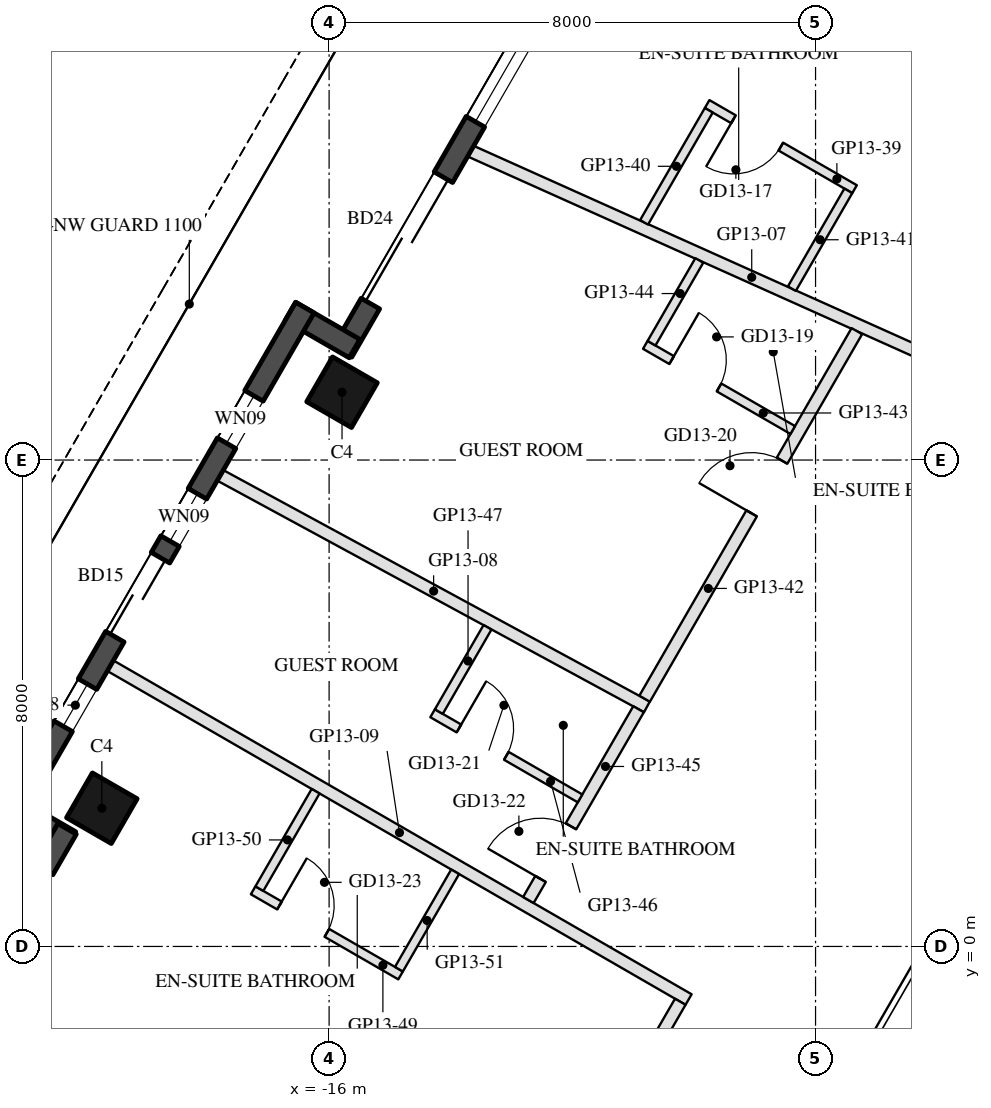
"""IFC4 building model, lengths in metres.
Left out: names, types, materials, properties, quantities, classifications, styles, units other than length and angle.
Written with IfcOpenShell. Run it as: python <this file> out.ifc"""

import sys

from ifc_helpers import new_model, si_unit, direction, frame, frame_2d, origin, origin_2d, place, context, subcontext, project, spatial, rectangle, hollow_rectangle, extrude, element, fill, save


model = new_model("IFC4")
c1 = context("Model", 3, precision=1e-05, world=origin(), true_north=direction((0.0, 1.0)))
c2 = subcontext(c1, "Body", "Model", "MODEL_VIEW")
j1 = project(units=[si_unit("LENGTHUNIT", "METRE"), si_unit("PLANEANGLEUNIT", "RADIAN")], contexts=[c1])
p1 = place(None, origin())
s1 = spatial("IfcSite", under=j1, at=p1, CompositionType="ELEMENT")
p2 = place(p1, origin())
s2 = spatial("IfcBuilding", under=s1, at=p2, CompositionType="ELEMENT")
p3 = place(p2, frame((0.0, 0.0, 157.7)))
s3 = spatial("IfcBuildingStorey", under=s2, at=p3, CompositionType="ELEMENT", Elevation=157.7)
for number, where, z_axis, x_axis in (
    (1, (-15.788, 9.115, 0.0), (0.0, 0.0, 1.0), (0.5, 0.866, 0.0)),
    (2, (-19.738, 2.273, 0.0), (0.0, 0.0, 1.0), (0.5, 0.866, 0.0)),
):
    element("IfcColumn", number, at=place(p3, frame(where, z_axis=z_axis, x_axis=x_axis)), inside=s3, PredefinedType="COLUMN", context=c2, shape_type="SweptSolid", body=[
        extrude(hollow_rectangle(XDim=0.85, YDim=0.85, WallThickness=0.04, at=origin_2d()), origin(), (0.0, 0.0, 1.0), 3.7),
    ])
p4 = place(p3, frame((-12.409, 15.617, 0.0), z_axis=(0.0, 0.0, 1.0), x_axis=(-0.500003597184, -0.866023326939, 0.0)))
e3 = element("IfcWall", 3, at=p4, inside=s3, PredefinedType="SOLIDWALL", context=c2, shape_type="SweptSolid", body=[
    extrude(rectangle(XDim=6.74, YDim=0.35, at=frame_2d((3.37, 0.0))), origin(), (0.0, 0.0, 1.0), 3.55),
])
p5 = place(p4, frame((0.77, 0.0, 0.3)))
e4 = element("IfcOpeningElement", 4, at=p5, cuts=e3, PredefinedType="OPENING", context=c2, shape_type="SweptSolid", body=[
    extrude(rectangle(XDim=1.6, YDim=2.65, at=frame_2d((0.8, 1.325))), frame((0.0, 0.185, 0.0), z_axis=(0.0, -1.0, 0.0), x_axis=(1.0, 0.0, 0.0)), (0.0, 0.0, 1.0), 0.37),
])
p6 = place(p4, frame((3.424, 0.0, 0.0)))
e5 = element("IfcOpeningElement", 5, at=p6, cuts=e3, PredefinedType="OPENING", context=c2, shape_type="SweptSolid", body=[
    extrude(rectangle(XDim=2.4, YDim=2.4, at=frame_2d((1.2, 1.2))), frame((0.0, 0.185, 0.0), z_axis=(0.0, -1.0, 0.0), x_axis=(1.0, 0.0, 0.0)), (0.0, 0.0, 1.0), 0.37),
])
p7 = place(p3, frame((-15.581, 9.833, 0.0), z_axis=(0.0, 0.0, 1.0), x_axis=(-0.866055662726, 0.499947586314, 0.0)))
e6 = element("IfcWall", 6, at=p7, inside=s3, PredefinedType="SOLIDWALL", context=c2, shape_type="SweptSolid", body=[
    extrude(rectangle(XDim=1.22, YDim=0.35, at=frame_2d((0.61, 0.0))), origin(), (0.0, 0.0, 1.0), 3.55),
])
p8 = place(p3, frame((-16.398, 10.507, 0.0), z_axis=(0.0, 0.0, 1.0), x_axis=(-0.499999142773, -0.866025898704, 0.0)))
e7 = element("IfcWall", 7, at=p8, inside=s3, PredefinedType="SOLIDWALL", context=c2, shape_type="SweptSolid", body=[
    extrude(rectangle(XDim=9.7, YDim=0.35, at=frame_2d((4.85, 0.0))), origin(), (0.0, 0.0, 1.0), 3.55),
])
p9 = place(p8, frame((1.675, 0.0, 0.3)))
e8 = element("IfcOpeningElement", 8, at=p9, cuts=e7, PredefinedType="OPENING", context=c2, shape_type="SweptSolid", body=[
    extrude(rectangle(XDim=0.9, YDim=2.65, at=frame_2d((0.45, 1.325))), frame((0.0, 0.185, 0.0), z_axis=(0.0, -1.0, 0.0), x_axis=(1.0, 0.0, 0.0)), (0.0, 0.0, 1.0), 0.37),
])
p10 = place(p8, frame((4.75, 0.0, 0.0)))
e9 = element("IfcOpeningElement", 9, at=p10, cuts=e7, PredefinedType="OPENING", context=c2, shape_type="SweptSolid", body=[
    extrude(rectangle(XDim=1.5, YDim=2.4, at=frame_2d((0.75, 1.2))), frame((0.0, 0.185, 0.0), z_axis=(0.0, -1.0, 0.0), x_axis=(1.0, 0.0, 0.0)), (0.0, 0.0, 1.0), 0.37),
])
p11 = place(p8, frame((3.535, 0.0, 0.3)))
e10 = element("IfcOpeningElement", 10, at=p11, cuts=e7, PredefinedType="OPENING", context=c2, shape_type="SweptSolid", body=[
    extrude(rectangle(XDim=0.9, YDim=2.65, at=frame_2d((0.45, 1.325))), frame((0.0, 0.185, 0.0), z_axis=(0.0, -1.0, 0.0), x_axis=(1.0, 0.0, 0.0)), (0.0, 0.0, 1.0), 0.37),
])
p12 = place(p8, frame((7.15, 0.0, 0.3)))
e11 = element("IfcOpeningElement", 11, at=p12, cuts=e7, PredefinedType="OPENING", context=c2, shape_type="SweptSolid", body=[
    extrude(rectangle(XDim=0.8, YDim=2.65, at=frame_2d((0.4, 1.325))), frame((0.0, 0.185, 0.0), z_axis=(0.0, -1.0, 0.0), x_axis=(1.0, 0.0, 0.0)), (0.0, 0.0, 1.0), 0.37),
])
p13 = place(p3, frame((-21.312, 2.346, 0.0), z_axis=(0.0, 0.0, 1.0), x_axis=(0.866005645448, -0.500034220881, 0.0)))
e12 = element("IfcWall", 12, at=p13, inside=s3, PredefinedType="SOLIDWALL", context=c2, shape_type="SweptSolid", body=[
    extrude(rectangle(XDim=1.22, YDim=0.35, at=frame_2d((0.61, 0.0))), origin(), (0.0, 0.0, 1.0), 3.55),
])
p14 = place(p3, frame((-20.309, 1.934, 0.0), z_axis=(0.0, 0.0, 1.0), x_axis=(-0.499992114976, -0.866029956157, 0.0)))
e13 = element("IfcWall", 13, at=p14, inside=s3, PredefinedType="SOLIDWALL", context=c2, shape_type="SweptSolid", body=[
    extrude(rectangle(XDim=6.74, YDim=0.35, at=frame_2d((3.37, 0.0))), origin(), (0.0, 0.0, 1.0), 3.55),
])
p15 = place(p14, frame((0.77, 0.0, 0.0)))
e14 = element("IfcOpeningElement", 14, at=p15, cuts=e13, PredefinedType="OPENING", context=c2, shape_type="SweptSolid", body=[
    extrude(rectangle(XDim=2.4, YDim=2.4, at=frame_2d((1.2, 1.2))), frame((0.0, 0.185, 0.0), z_axis=(0.0, -1.0, 0.0), x_axis=(1.0, 0.0, 0.0)), (0.0, 0.0, 1.0), 0.37),
])
p16 = place(p14, frame((3.47, 0.0, 0.3)))
e15 = element("IfcOpeningElement", 15, at=p16, cuts=e13, PredefinedType="OPENING", context=c2, shape_type="SweptSolid", body=[
    extrude(rectangle(XDim=2.9, YDim=2.65, at=frame_2d((1.45, 1.325))), frame((0.0, 0.185, 0.0), z_axis=(0.0, -1.0, 0.0), x_axis=(1.0, 0.0, 0.0)), (0.0, 0.0, 1.0), 0.37),
])
p17 = place(p3, frame((-13.672, 13.08, 0.0), z_axis=(0.0, 0.0, 1.0), x_axis=(0.912311972773, -0.409495866077, 0.0)))
e16 = element("IfcWall", 16, at=p17, inside=s3, PredefinedType="PARTITIONING", context=c2, shape_type="SweptSolid", body=[
    extrude(rectangle(XDim=10.132, YDim=0.2, at=frame_2d((5.066, 0.0))), origin(), (0.0, 0.0, 1.0), 3.06),
])
p18 = place(p3, frame((-17.79, 7.748, 0.0), z_axis=(0.0, 0.0, 1.0), x_axis=(0.878932558121, -0.476946074808, 0.0)))
e17 = element("IfcWall", 17, at=p18, inside=s3, PredefinedType="PARTITIONING", context=c2, shape_type="SweptSolid", body=[
    extrude(rectangle(XDim=7.983, YDim=0.2, at=frame_2d((3.991, 0.0))), origin(), (0.0, 0.0, 1.0), 3.06),
])
p19 = place(p3, frame((-19.597, 4.617, 0.0), z_axis=(0.0, 0.0, 1.0), x_axis=(0.866027479907, -0.499996404033, 0.0)))
e18 = element("IfcWall", 18, at=p19, inside=s3, PredefinedType="PARTITIONING", context=c2, shape_type="SweptSolid", body=[
    extrude(rectangle(XDim=10.98, YDim=0.2, at=frame_2d((5.49, 0.0))), origin(), (0.0, 0.0, 1.0), 3.06),
])
p20 = place(p3, frame((-7.358, 12.455, 0.0), z_axis=(0.0, 0.0, 1.0), x_axis=(-0.866034573852, 0.49998411664, 0.0)))
e19 = element("IfcWall", 19, at=p20, inside=s3, PredefinedType="PARTITIONING", context=c2, shape_type="SweptSolid", body=[
    extrude(rectangle(XDim=2.8, YDim=0.15, at=frame_2d((1.4, 0.0))), origin(), (0.0, 0.0, 1.0), 3.55),
])
p21 = place(p20, frame((1.4, 0.0, 0.0)))
e20 = element("IfcOpeningElement", 20, at=p21, cuts=e19, PredefinedType="OPENING", context=c2, shape_type="SweptSolid", body=[
    extrude(rectangle(XDim=0.9, YDim=2.1, at=frame_2d((0.45, 1.05))), frame((0.0, 0.085, 0.0), z_axis=(0.0, -1.0, 0.0), x_axis=(1.0, 0.0, 0.0)), (0.0, 0.0, 1.0), 0.17),
])
p22 = place(p3, frame((-9.756, 13.752, 0.0), z_axis=(0.0, 0.0, 1.0), x_axis=(-0.50001378257, -0.866017446268, 0.0)))
e21 = element("IfcWall", 21, at=p22, inside=s3, PredefinedType="PARTITIONING", context=c2, shape_type="SweptSolid", body=[
    extrude(rectangle(XDim=2.128, YDim=0.15, at=frame_2d((1.064, 0.0))), origin(), (0.0, 0.0, 1.0), 3.55),
])
p23 = place(p3, frame((-7.461, 12.427, 0.0), z_axis=(0.0, 0.0, 1.0), x_axis=(-0.500025795397, -0.866010510293, 0.0)))
e22 = element("IfcWall", 22, at=p23, inside=s3, PredefinedType="PARTITIONING", context=c2, shape_type="SweptSolid", body=[
    extrude(rectangle(XDim=1.858, YDim=0.15, at=frame_2d((0.929, 0.0))), origin(), (0.0, 0.0, 1.0), 3.55),
])
p24 = place(p3, frame((-10.811, 4.075, 0.0), z_axis=(0.0, 0.0, 1.0), x_axis=(0.500006032813, 0.86602192071, 0.0)))
e23 = element("IfcWall", 23, at=p24, inside=s3, PredefinedType="PARTITIONING", context=c2, shape_type="SweptSolid", body=[
    extrude(rectangle(XDim=6.98, YDim=0.2, at=frame_2d((3.49, 0.0))), origin(), (0.0, 0.0, 1.0), 2.95),
])
p25 = place(p24, frame((3.52, 0.0, 0.0)))
e24 = element("IfcOpeningElement", 24, at=p25, cuts=e23, PredefinedType="OPENING", context=c2, shape_type="SweptSolid", body=[
    extrude(rectangle(XDim=1.0, YDim=2.1, at=frame_2d((0.5, 1.05))), frame((0.0, 0.11, 0.0), z_axis=(0.0, -1.0, 0.0), x_axis=(1.0, 0.0, 0.0)), (0.0, 0.0, 1.0), 0.22),
])
p26 = place(p3, frame((-10.8, 9.894, 0.0), z_axis=(0.0, 0.0, 1.0), x_axis=(0.866056369097, -0.49994636267, 0.0)))
e25 = element("IfcWall", 25, at=p26, inside=s3, PredefinedType="PARTITIONING", context=c2, shape_type="SweptSolid", body=[
    extrude(rectangle(XDim=2.8, YDim=0.15, at=frame_2d((1.4, 0.0))), origin(), (0.0, 0.0, 1.0), 3.55),
])
p27 = place(p26, frame((0.5, 0.0, 0.0)))
e26 = element("IfcOpeningElement", 26, at=p27, cuts=e25, PredefinedType="OPENING", context=c2, shape_type="SweptSolid", body=[
    extrude(rectangle(XDim=0.9, YDim=2.1, at=frame_2d((0.45, 1.05))), frame((0.0, 0.085, 0.0), z_axis=(0.0, -1.0, 0.0), x_axis=(1.0, 0.0, 0.0)), (0.0, 0.0, 1.0), 0.17),
])
p28 = place(p3, frame((-9.912, 11.283, 0.0), z_axis=(0.0, 0.0, 1.0), x_axis=(-0.499964459118, -0.86604592235, 0.0)))
e27 = element("IfcWall", 27, at=p28, inside=s3, PredefinedType="PARTITIONING", context=c2, shape_type="SweptSolid", body=[
    extrude(rectangle(XDim=1.572, YDim=0.15, at=frame_2d((0.786, 0.0))), origin(), (0.0, 0.0, 1.0), 2.95),
])
p29 = place(p3, frame((-12.723, 0.764, 0.0), z_axis=(0.0, 0.0, 1.0), x_axis=(0.500016018658, 0.86601615521, 0.0)))
e28 = element("IfcWall", 28, at=p29, inside=s3, PredefinedType="PARTITIONING", context=c2, shape_type="SweptSolid", body=[
    extrude(rectangle(XDim=3.624, YDim=0.2, at=frame_2d((1.812, 0.0))), origin(), (0.0, 0.0, 1.0), 2.95),
])
p30 = place(p29, frame((0.4, 0.0, 0.0)))
e29 = element("IfcOpeningElement", 29, at=p30, cuts=e28, PredefinedType="OPENING", context=c2, shape_type="SweptSolid", body=[
    extrude(rectangle(XDim=1.0, YDim=2.1, at=frame_2d((0.5, 1.05))), frame((0.0, 0.11, 0.0), z_axis=(0.0, -1.0, 0.0), x_axis=(1.0, 0.0, 0.0)), (0.0, 0.0, 1.0), 0.22),
])
p31 = place(p3, frame((-14.298, 3.835, 0.0), z_axis=(0.0, 0.0, 1.0), x_axis=(0.866056369097, -0.49994636267, 0.0)))
e30 = element("IfcWall", 30, at=p31, inside=s3, PredefinedType="PARTITIONING", context=c2, shape_type="SweptSolid", body=[
    extrude(rectangle(XDim=2.8, YDim=0.15, at=frame_2d((1.4, 0.0))), origin(), (0.0, 0.0, 1.0), 2.95),
])
p32 = place(p31, frame((0.5, 0.0, 0.0)))
e31 = element("IfcOpeningElement", 31, at=p32, cuts=e30, PredefinedType="OPENING", context=c2, shape_type="SweptSolid", body=[
    extrude(rectangle(XDim=0.9, YDim=2.1, at=frame_2d((0.45, 1.05))), frame((0.0, 0.085, 0.0), z_axis=(0.0, -1.0, 0.0), x_axis=(1.0, 0.0, 0.0)), (0.0, 0.0, 1.0), 0.17),
])
p33 = place(p3, frame((-13.395, 5.249, 0.0), z_axis=(0.0, 0.0, 1.0), x_axis=(-0.499960029081, -0.866048479775, 0.0)))
e32 = element("IfcWall", 32, at=p33, inside=s3, PredefinedType="PARTITIONING", context=c2, shape_type="SweptSolid", body=[
    extrude(rectangle(XDim=1.601, YDim=0.15, at=frame_2d((0.801, 0.0))), origin(), (0.0, 0.0, 1.0), 3.55),
])
p34 = place(p3, frame((-12.269, -4.45, 0.0), z_axis=(0.0, 0.0, 1.0), x_axis=(0.500011931275, 0.86601851515, 0.0)))
e33 = element("IfcWall", 33, at=p34, inside=s3, PredefinedType="PARTITIONING", context=c2, shape_type="SweptSolid", body=[
    extrude(rectangle(XDim=4.088, YDim=0.2, at=frame_2d((2.044, 0.0))), origin(), (0.0, 0.0, 1.0), 2.95),
])
p35 = place(p34, frame((1.544, 0.0, 0.0)))
e34 = element("IfcOpeningElement", 34, at=p35, cuts=e33, PredefinedType="OPENING", context=c2, shape_type="SweptSolid", body=[
    extrude(rectangle(XDim=1.0, YDim=2.1, at=frame_2d((0.5, 1.05))), frame((0.0, 0.11, 0.0), z_axis=(0.0, -1.0, 0.0), x_axis=(1.0, 0.0, 0.0)), (0.0, 0.0, 1.0), 0.22),
])
p36 = place(p3, frame((-17.249, 0.923, 0.0), z_axis=(0.0, 0.0, 1.0), x_axis=(0.866034573852, -0.49998411664, 0.0)))
e35 = element("IfcWall", 35, at=p36, inside=s3, PredefinedType="PARTITIONING", context=c2, shape_type="SweptSolid", body=[
    extrude(rectangle(XDim=2.8, YDim=0.15, at=frame_2d((1.4, 0.0))), origin(), (0.0, 0.0, 1.0), 2.95),
])
p37 = place(p36, frame((0.5, 0.0, 0.0)))
e36 = element("IfcOpeningElement", 36, at=p37, cuts=e35, PredefinedType="OPENING", context=c2, shape_type="SweptSolid", body=[
    extrude(rectangle(XDim=0.9, YDim=2.1, at=frame_2d((0.45, 1.05))), frame((0.0, 0.085, 0.0), z_axis=(0.0, -1.0, 0.0), x_axis=(1.0, 0.0, 0.0)), (0.0, 0.0, 1.0), 0.17),
])
for number, where, z_axis, x_axis in (
    (37, (-16.222, 2.553, 0.0), (0.0, 0.0, 1.0), (-0.5, -0.866, 0.0)),
    (38, (-13.927, 1.228, 0.0), (0.0, 0.0, 1.0), (-0.5, -0.866, 0.0)),
):
    element("IfcWall", number, at=place(p3, frame(where, z_axis=z_axis, x_axis=x_axis)), inside=s3, PredefinedType="PARTITIONING", context=c2, shape_type="SweptSolid", body=[
        extrude(rectangle(XDim=1.85, YDim=0.15, at=frame_2d((0.925, 0.0))), origin(), (0.0, 0.0, 1.0), 3.55),
    ])
p38 = place(p5, origin())
e39 = element("IfcWindow", 39, at=p38, inside=s3, PartitioningType="SINGLE_PANEL", PredefinedType="WINDOW", context=c2, shape_type="SweptSolid", body=[
    extrude(rectangle(XDim=1.6, YDim=2.65, at=frame_2d((0.8, 1.325))), frame((0.0, 0.03, 0.0), z_axis=(0.0, -1.0, 0.0), x_axis=(1.0, 0.0, 0.0)), (0.0, 0.0, 1.0), 0.06),
])
fill(e4, e39)
p39 = place(p6, frame((2.4, 0.0, 0.0), z_axis=(0.0, 0.0, 1.0), x_axis=(-1.0, 0.0, 0.0)))
e40 = element("IfcDoor", 40, at=p39, inside=s3, OperationType="SLIDING_TO_LEFT", PredefinedType="DOOR", context=c2, shape_type="SweptSolid", body=[
    extrude(rectangle(XDim=2.4, YDim=2.4, at=frame_2d((1.2, 1.2))), frame((0.0, 0.025, 0.0), z_axis=(0.0, -1.0, 0.0), x_axis=(1.0, 0.0, 0.0)), (0.0, 0.0, 1.0), 0.05),
])
fill(e5, e40)
p40 = place(p9, origin())
e41 = element("IfcWindow", 41, at=p40, inside=s3, PartitioningType="SINGLE_PANEL", PredefinedType="WINDOW", context=c2, shape_type="SweptSolid", body=[
    extrude(rectangle(XDim=0.9, YDim=2.65, at=frame_2d((0.45, 1.325))), frame((0.0, 0.03, 0.0), z_axis=(0.0, -1.0, 0.0), x_axis=(1.0, 0.0, 0.0)), (0.0, 0.0, 1.0), 0.06),
])
fill(e8, e41)
p41 = place(p10, frame((1.5, 0.0, 0.0), z_axis=(0.0, 0.0, 1.0), x_axis=(-1.0, 0.0, 0.0)))
e42 = element("IfcDoor", 42, at=p41, inside=s3, OperationType="SLIDING_TO_LEFT", PredefinedType="DOOR", context=c2, shape_type="SweptSolid", body=[
    extrude(rectangle(XDim=1.5, YDim=2.4, at=frame_2d((0.75, 1.2))), frame((0.0, 0.025, 0.0), z_axis=(0.0, -1.0, 0.0), x_axis=(1.0, 0.0, 0.0)), (0.0, 0.0, 1.0), 0.05),
])
fill(e9, e42)
p42 = place(p11, origin())
e43 = element("IfcWindow", 43, at=p42, inside=s3, PartitioningType="SINGLE_PANEL", PredefinedType="WINDOW", context=c2, shape_type="SweptSolid", body=[
    extrude(rectangle(XDim=0.9, YDim=2.65, at=frame_2d((0.45, 1.325))), frame((0.0, 0.03, 0.0), z_axis=(0.0, -1.0, 0.0), x_axis=(1.0, 0.0, 0.0)), (0.0, 0.0, 1.0), 0.06),
])
fill(e10, e43)
p43 = place(p12, origin())
e44 = element("IfcWindow", 44, at=p43, inside=s3, PartitioningType="SINGLE_PANEL", PredefinedType="WINDOW", context=c2, shape_type="SweptSolid", body=[
    extrude(rectangle(XDim=0.8, YDim=2.65, at=frame_2d((0.4, 1.325))), frame((0.0, 0.03, 0.0), z_axis=(0.0, -1.0, 0.0), x_axis=(1.0, 0.0, 0.0)), (0.0, 0.0, 1.0), 0.06),
])
fill(e11, e44)
p44 = place(p21, origin())
e45 = element("IfcDoor", 45, at=p44, inside=s3, OperationType="SINGLE_SWING_RIGHT", PredefinedType="DOOR", context=c2, shape_type="SweptSolid", body=[
    extrude(rectangle(XDim=0.9, YDim=2.1, at=frame_2d((0.45, 1.05))), frame((0.0, 0.025, 0.0), z_axis=(0.0, -1.0, 0.0), x_axis=(1.0, 0.0, 0.0)), (0.0, 0.0, 1.0), 0.05),
])
fill(e20, e45)
p45 = place(p27, origin())
e46 = element("IfcDoor", 46, at=p45, inside=s3, OperationType="SINGLE_SWING_LEFT", PredefinedType="DOOR", context=c2, shape_type="SweptSolid", body=[
    extrude(rectangle(XDim=0.9, YDim=2.1, at=frame_2d((0.45, 1.05))), frame((0.0, 0.025, 0.0), z_axis=(0.0, -1.0, 0.0), x_axis=(1.0, 0.0, 0.0)), (0.0, 0.0, 1.0), 0.05),
])
fill(e26, e46)
p46 = place(p25, origin())
e47 = element("IfcDoor", 47, at=p46, inside=s3, OperationType="SINGLE_SWING_LEFT", PredefinedType="DOOR", context=c2, shape_type="SweptSolid", body=[
    extrude(rectangle(XDim=1.0, YDim=2.1, at=frame_2d((0.5, 1.05))), frame((0.0, 0.025, 0.0), z_axis=(0.0, -1.0, 0.0), x_axis=(1.0, 0.0, 0.0)), (0.0, 0.0, 1.0), 0.05),
])
fill(e24, e47)
p47 = place(p32, origin())
e48 = element("IfcDoor", 48, at=p47, inside=s3, OperationType="SINGLE_SWING_LEFT", PredefinedType="DOOR", context=c2, shape_type="SweptSolid", body=[
    extrude(rectangle(XDim=0.9, YDim=2.1, at=frame_2d((0.45, 1.05))), frame((0.0, 0.025, 0.0), z_axis=(0.0, -1.0, 0.0), x_axis=(1.0, 0.0, 0.0)), (0.0, 0.0, 1.0), 0.05),
])
fill(e31, e48)
p48 = place(p30, origin())
e49 = element("IfcDoor", 49, at=p48, inside=s3, OperationType="SINGLE_SWING_LEFT", PredefinedType="DOOR", context=c2, shape_type="SweptSolid", body=[
    extrude(rectangle(XDim=1.0, YDim=2.1, at=frame_2d((0.5, 1.05))), frame((0.0, 0.025, 0.0), z_axis=(0.0, -1.0, 0.0), x_axis=(1.0, 0.0, 0.0)), (0.0, 0.0, 1.0), 0.05),
])
fill(e29, e49)
p49 = place(p37, origin())
e50 = element("IfcDoor", 50, at=p49, inside=s3, OperationType="SINGLE_SWING_LEFT", PredefinedType="DOOR", context=c2, shape_type="SweptSolid", body=[
    extrude(rectangle(XDim=0.9, YDim=2.1, at=frame_2d((0.45, 1.05))), frame((0.0, 0.025, 0.0), z_axis=(0.0, -1.0, 0.0), x_axis=(1.0, 0.0, 0.0)), (0.0, 0.0, 1.0), 0.05),
])
fill(e36, e50)
save(model, sys.argv[1])
